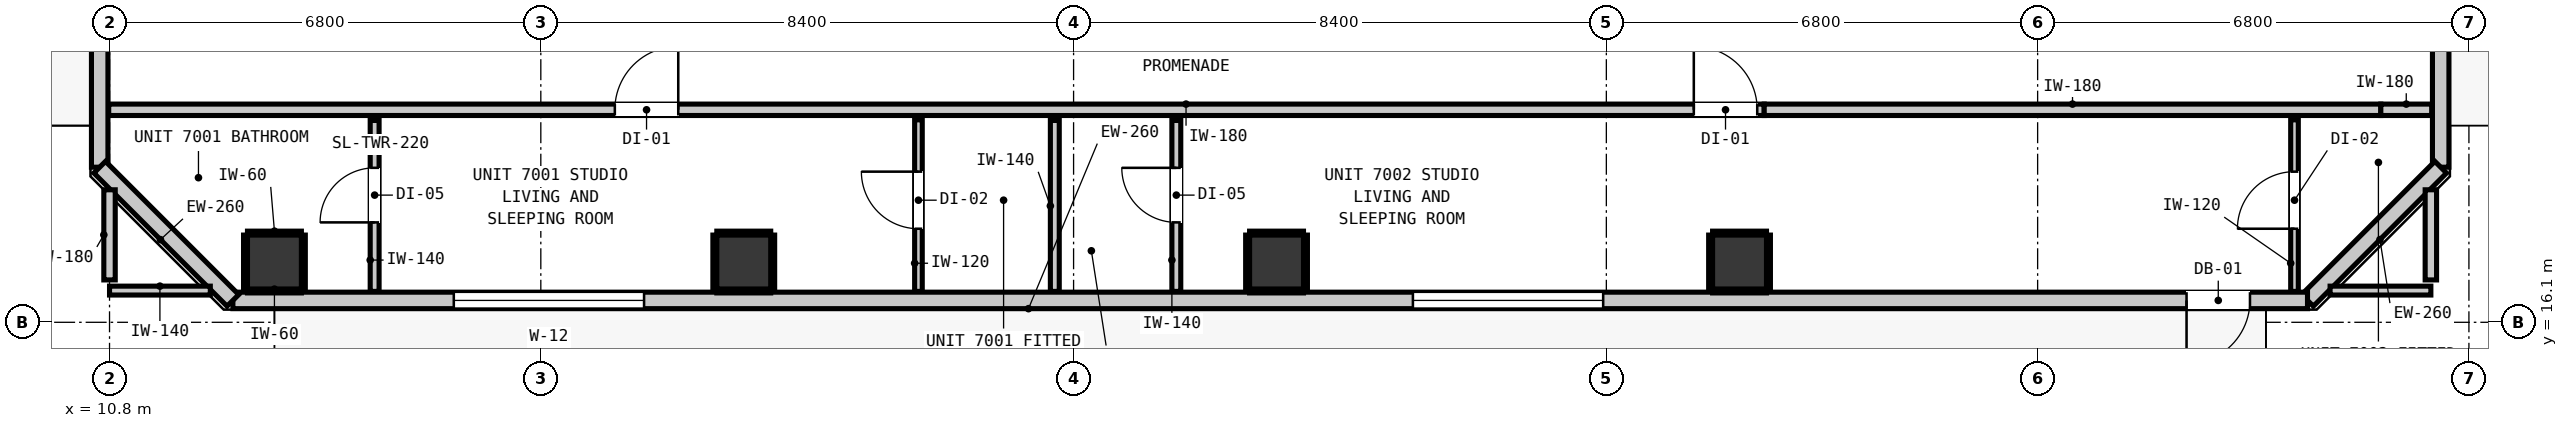
"""IFC4 building model, lengths in metres.
Left out: names, types, materials, properties, quantities, classifications, styles, units other than length and angle.
Written with IfcOpenShell. Run it as: python <this file> out.ifc"""

import sys

from ifc_helpers import new_model, si_unit, direction, frame, frame_2d, origin, origin_2d, place, context, subcontext, project, spatial, rectangle, extrude, element, fill, save


model = new_model("IFC4")
c1 = context("Model", 3, precision=1e-05, world=origin(), true_north=direction((0.0, 1.0)))
c2 = subcontext(c1, "Body", "Model", "MODEL_VIEW")
j1 = project(units=[si_unit("LENGTHUNIT", "METRE"), si_unit("PLANEANGLEUNIT", "RADIAN")], contexts=[c1])
p1 = place(None, origin())
s1 = spatial("IfcSite", under=j1, at=p1, CompositionType="ELEMENT")
p2 = place(p1, origin())
s2 = spatial("IfcBuilding", under=s1, at=p2, CompositionType="ELEMENT")
p3 = place(p2, frame((0.0, 0.0, 241.24)))
s3 = spatial("IfcBuildingStorey", under=s2, at=p3, CompositionType="ELEMENT", Elevation=241.24)
for number, where, z_axis, x_axis in (
    (1, (13.4, 17.05, 0.0), (0.0, 0.0, 1.0), (1.0, 0.0, 0.0)),
    (2, (20.8, 17.05, 0.0), (0.0, 0.0, 1.0), (1.0, 0.0, 0.0)),
    (3, (29.2, 17.05, 0.0), (0.0, 0.0, 1.0), (1.0, 0.0, 0.0)),
    (4, (36.5, 17.05, 0.0), (0.0, 0.0, 1.0), (1.0, 0.0, 0.0)),
):
    element("IfcColumn", number, at=place(p3, frame(where, z_axis=z_axis, x_axis=x_axis)), inside=s3, PredefinedType="COLUMN", context=c2, shape_type="SweptSolid", body=[
        extrude(rectangle(XDim=0.85, YDim=0.85, at=origin_2d()), origin(), (0.0, 0.0, 1.0), 3.32),
    ])
p4 = place(p3, frame((10.645, 18.545, 0.0), z_axis=(0.0, 0.0, 1.0), x_axis=(0.0, 1.0, 0.0)))
e5 = element("IfcWall", 5, at=p4, inside=s3, PredefinedType="STANDARD", context=c2, shape_type="SweptSolid", body=[
    extrude(rectangle(XDim=30.31, YDim=0.26, at=frame_2d((15.155, 0.0))), origin(), (0.0, 0.0, 1.0), 3.1),
])
p5 = place(p4, frame((27.695, 0.0, 0.0)))
e6 = element("IfcOpeningElement", 6, at=p5, cuts=e5, PredefinedType="OPENING", context=c2, shape_type="SweptSolid", body=[
    extrude(rectangle(XDim=1.0, YDim=2.15, at=frame_2d((0.5, 1.075))), frame((0.0, 0.14, 0.0), z_axis=(0.0, -1.0, 0.0), x_axis=(1.0, 0.0, 0.0)), (0.0, 0.0, 1.0), 0.28),
])
p6 = place(p4, frame((29.108, 0.0, 0.85)))
e7 = element("IfcOpeningElement", 7, at=p6, cuts=e5, PredefinedType="OPENING", context=c2, shape_type="SweptSolid", body=[
    extrude(rectangle(XDim=0.9, YDim=1.5, at=frame_2d((0.45, 0.75))), frame((0.0, 0.14, 0.0), z_axis=(0.0, -1.0, 0.0), x_axis=(1.0, 0.0, 0.0)), (0.0, 0.0, 1.0), 0.28),
])
p7 = place(p3, frame((47.555, 48.855, 0.0), z_axis=(0.0, 0.0, 1.0), x_axis=(0.0, -1.0, 0.0)))
e8 = element("IfcWall", 8, at=p7, inside=s3, PredefinedType="STANDARD", context=c2, shape_type="SweptSolid", body=[
    extrude(rectangle(XDim=30.31, YDim=0.26, at=frame_2d((15.155, 0.0))), origin(), (0.0, 0.0, 1.0), 3.1),
])
p8 = place(p7, frame((0.91, 0.0, 0.0)))
e9 = element("IfcOpeningElement", 9, at=p8, cuts=e8, PredefinedType="OPENING", context=c2, shape_type="SweptSolid", body=[
    extrude(rectangle(XDim=1.0, YDim=2.15, at=frame_2d((0.5, 1.075))), frame((0.0, 0.14, 0.0), z_axis=(0.0, -1.0, 0.0), x_axis=(1.0, 0.0, 0.0)), (0.0, 0.0, 1.0), 0.28),
])
p9 = place(p7, frame((2.957, 0.0, 0.85)))
e10 = element("IfcOpeningElement", 10, at=p9, cuts=e8, PredefinedType="OPENING", context=c2, shape_type="SweptSolid", body=[
    extrude(rectangle(XDim=3.0, YDim=2.1, at=frame_2d((1.5, 1.05))), frame((0.0, 0.14, 0.0), z_axis=(0.0, -1.0, 0.0), x_axis=(1.0, 0.0, 0.0)), (0.0, 0.0, 1.0), 0.28),
])
p10 = place(p7, frame((21.005, 0.0, 0.85)))
e11 = element("IfcOpeningElement", 11, at=p10, cuts=e8, PredefinedType="OPENING", context=c2, shape_type="SweptSolid", body=[
    extrude(rectangle(XDim=3.0, YDim=2.1, at=frame_2d((1.5, 1.05))), frame((0.0, 0.14, 0.0), z_axis=(0.0, -1.0, 0.0), x_axis=(1.0, 0.0, 0.0)), (0.0, 0.0, 1.0), 0.28),
])
p11 = place(p3, frame((47.555, 18.545, 0.0), z_axis=(0.0, 0.0, 1.0), x_axis=(-0.707106781187, -0.707106781187, 0.0)))
e12 = element("IfcWall", 12, at=p11, inside=s3, PredefinedType="STANDARD", context=c2, shape_type="SweptSolid", body=[
    extrude(rectangle(XDim=2.97, YDim=0.26, at=frame_2d((1.485, 0.0))), origin(), (0.0, 0.0, 1.0), 3.1),
])
p12 = place(p3, frame((45.455, 16.445, 0.0), z_axis=(0.0, 0.0, 1.0), x_axis=(-1.0, 0.0, 0.0)))
e13 = element("IfcWall", 13, at=p12, inside=s3, PredefinedType="STANDARD", context=c2, shape_type="SweptSolid", body=[
    extrude(rectangle(XDim=32.71, YDim=0.26, at=frame_2d((16.355, 0.0))), origin(), (0.0, 0.0, 1.0), 3.1),
])
p13 = place(p12, frame((0.907, 0.0, 0.0)))
e14 = element("IfcOpeningElement", 14, at=p13, cuts=e13, PredefinedType="OPENING", context=c2, shape_type="SweptSolid", body=[
    extrude(rectangle(XDim=1.0, YDim=2.15, at=frame_2d((0.5, 1.075))), frame((0.0, 0.14, 0.0), z_axis=(0.0, -1.0, 0.0), x_axis=(1.0, 0.0, 0.0)), (0.0, 0.0, 1.0), 0.28),
])
p14 = place(p12, frame((26.227, 0.0, 0.85)))
e15 = element("IfcOpeningElement", 15, at=p14, cuts=e13, PredefinedType="OPENING", context=c2, shape_type="SweptSolid", body=[
    extrude(rectangle(XDim=3.0, YDim=2.1, at=frame_2d((1.5, 1.05))), frame((0.0, 0.14, 0.0), z_axis=(0.0, -1.0, 0.0), x_axis=(1.0, 0.0, 0.0)), (0.0, 0.0, 1.0), 0.28),
])
p15 = place(p12, frame((11.105, 0.0, 0.85)))
e16 = element("IfcOpeningElement", 16, at=p15, cuts=e13, PredefinedType="OPENING", context=c2, shape_type="SweptSolid", body=[
    extrude(rectangle(XDim=3.0, YDim=2.1, at=frame_2d((1.5, 1.05))), frame((0.0, 0.14, 0.0), z_axis=(0.0, -1.0, 0.0), x_axis=(1.0, 0.0, 0.0)), (0.0, 0.0, 1.0), 0.28),
])
p16 = place(p3, frame((12.745, 16.445, 0.0), z_axis=(0.0, 0.0, 1.0), x_axis=(-0.707147883682, 0.707065676302, 0.0)))
e17 = element("IfcWall", 17, at=p16, inside=s3, PredefinedType="STANDARD", context=c2, shape_type="SweptSolid", body=[
    extrude(rectangle(XDim=2.97, YDim=0.26, at=frame_2d((1.485, 0.0))), origin(), (0.0, 0.0, 1.0), 3.1),
])
p17 = place(p3, frame((10.787, 19.45, 0.0), z_axis=(0.0, 0.0, 1.0), x_axis=(1.0, 0.0, 0.0)))
e18 = element("IfcWall", 18, at=p17, inside=s3, PredefinedType="PARTITIONING", context=c2, shape_type="SweptSolid", body=[
    extrude(rectangle(XDim=26.102, YDim=0.18, at=frame_2d((13.051, 0.0))), origin(), (0.0, 0.0, 1.0), 3.1),
])
p18 = place(p17, frame((7.98, 0.0, 0.0)))
e19 = element("IfcOpeningElement", 19, at=p18, cuts=e18, PredefinedType="OPENING", context=c2, shape_type="SweptSolid", body=[
    extrude(rectangle(XDim=1.0, YDim=2.15, at=frame_2d((0.5, 1.075))), frame((0.0, 0.1, 0.0), z_axis=(0.0, -1.0, 0.0), x_axis=(1.0, 0.0, 0.0)), (0.0, 0.0, 1.0), 0.2),
])
p19 = place(p17, frame((24.992, 0.0, 0.0)))
e20 = element("IfcOpeningElement", 20, at=p19, cuts=e18, PredefinedType="OPENING", context=c2, shape_type="SweptSolid", body=[
    extrude(rectangle(XDim=1.0, YDim=2.15, at=frame_2d((0.5, 1.075))), frame((0.0, 0.1, 0.0), z_axis=(0.0, -1.0, 0.0), x_axis=(1.0, 0.0, 0.0)), (0.0, 0.0, 1.0), 0.2),
])
p20 = place(p3, frame((36.889, 19.45, 0.0), z_axis=(0.0, 0.0, 1.0), x_axis=(1.0, 0.0, 0.0)))
e21 = element("IfcWall", 21, at=p20, inside=s3, PredefinedType="PARTITIONING", context=c2, shape_type="SweptSolid", body=[
    extrude(rectangle(XDim=9.722, YDim=0.18, at=frame_2d((4.861, 0.0))), origin(), (0.0, 0.0, 1.0), 2.477),
])
p21 = place(p3, frame((46.611, 19.45, 0.0), z_axis=(0.0, 0.0, 1.0), x_axis=(1.0, 0.0, 0.0)))
e22 = element("IfcWall", 22, at=p21, inside=s3, PredefinedType="PARTITIONING", context=c2, shape_type="SweptSolid", body=[
    extrude(rectangle(XDim=0.802, YDim=0.18, at=frame_2d((0.401, 0.0))), origin(), (0.0, 0.0, 1.0), 3.1),
])
for number, where, z_axis, x_axis in (
    (23, (10.8, 16.6, 0.0), (0.0, 0.0, 1.0), (1.0, 0.0, 0.0)),
    (24, (45.811, 16.6, 0.0), (0.0, 0.0, 1.0), (1.0, 0.0, 0.0)),
):
    element("IfcWall", number, at=place(p3, frame(where, z_axis=z_axis, x_axis=x_axis)), inside=s3, PredefinedType="PARTITIONING", context=c2, shape_type="SweptSolid", body=[
        extrude(rectangle(XDim=1.589, YDim=0.14, at=frame_2d((0.794, 0.0))), origin(), (0.0, 0.0, 1.0), 3.1),
    ])
for number, where, z_axis, x_axis in (
    (25, (10.8, 16.768, 0.0), (0.0, 0.0, 1.0), (0.0, 1.0, 0.0)),
    (26, (47.4, 16.768, 0.0), (0.0, 0.0, 1.0), (0.0, 1.0, 0.0)),
):
    element("IfcWall", number, at=place(p3, frame(where, z_axis=z_axis, x_axis=x_axis)), inside=s3, PredefinedType="PARTITIONING", context=c2, shape_type="SweptSolid", body=[
        extrude(rectangle(XDim=1.421, YDim=0.18, at=frame_2d((0.71, 0.0))), origin(), (0.0, 0.0, 1.0), 3.1),
    ])
p22 = place(p3, frame((14.98, 16.587, 0.0), z_axis=(0.0, 0.0, 1.0), x_axis=(0.0, 1.0, 0.0)))
e27 = element("IfcWall", 27, at=p22, inside=s3, PredefinedType="PARTITIONING", context=c2, shape_type="SweptSolid", body=[
    extrude(rectangle(XDim=2.695, YDim=0.14, at=frame_2d((1.348, 0.0))), origin(), (0.0, 0.0, 1.0), 3.1),
])
p23 = place(p22, frame((1.088, 0.0, 0.0)))
e28 = element("IfcOpeningElement", 28, at=p23, cuts=e27, PredefinedType="OPENING", context=c2, shape_type="SweptSolid", body=[
    extrude(rectangle(XDim=0.86, YDim=2.02, at=frame_2d((0.43, 1.01))), frame((0.0, 0.08, 0.0), z_axis=(0.0, -1.0, 0.0), x_axis=(1.0, 0.0, 0.0)), (0.0, 0.0, 1.0), 0.16),
])
p24 = place(p3, frame((25.704, 16.587, 0.0), z_axis=(0.0, 0.0, 1.0), x_axis=(0.0, 1.0, 0.0)))
e29 = element("IfcWall", 29, at=p24, inside=s3, PredefinedType="PARTITIONING", context=c2, shape_type="SweptSolid", body=[
    extrude(rectangle(XDim=2.695, YDim=0.14, at=frame_2d((1.348, 0.0))), origin(), (0.0, 0.0, 1.0), 3.1),
])
p25 = place(p3, frame((27.62, 16.587, 0.0), z_axis=(0.0, 0.0, 1.0), x_axis=(0.0, 1.0, 0.0)))
e30 = element("IfcWall", 30, at=p25, inside=s3, PredefinedType="PARTITIONING", context=c2, shape_type="SweptSolid", body=[
    extrude(rectangle(XDim=2.695, YDim=0.14, at=frame_2d((1.348, 0.0))), origin(), (0.0, 0.0, 1.0), 3.1),
])
p26 = place(p25, frame((1.088, 0.0, 0.0)))
e31 = element("IfcOpeningElement", 31, at=p26, cuts=e30, PredefinedType="OPENING", context=c2, shape_type="SweptSolid", body=[
    extrude(rectangle(XDim=0.86, YDim=2.02, at=frame_2d((0.43, 1.01))), frame((0.0, 0.08, 0.0), z_axis=(0.0, -1.0, 0.0), x_axis=(1.0, 0.0, 0.0)), (0.0, 0.0, 1.0), 0.16),
])
p27 = place(p3, frame((23.554, 16.587, 0.0), z_axis=(0.0, 0.0, 1.0), x_axis=(0.0, 1.0, 0.0)))
e32 = element("IfcWall", 32, at=p27, inside=s3, PredefinedType="PARTITIONING", context=c2, shape_type="SweptSolid", body=[
    extrude(rectangle(XDim=2.705, YDim=0.12, at=frame_2d((1.353, 0.0))), origin(), (0.0, 0.0, 1.0), 3.1),
])
p28 = place(p27, frame((0.988, 0.0, 0.0)))
e33 = element("IfcOpeningElement", 33, at=p28, cuts=e32, PredefinedType="OPENING", context=c2, shape_type="SweptSolid", body=[
    extrude(rectangle(XDim=0.9, YDim=2.1, at=frame_2d((0.45, 1.05))), frame((0.0, 0.07, 0.0), z_axis=(0.0, -1.0, 0.0), x_axis=(1.0, 0.0, 0.0)), (0.0, 0.0, 1.0), 0.14),
])
p29 = place(p3, frame((45.25, 16.587, 0.0), z_axis=(0.0, 0.0, 1.0), x_axis=(0.0, 1.0, 0.0)))
e34 = element("IfcWall", 34, at=p29, inside=s3, PredefinedType="PARTITIONING", context=c2, shape_type="SweptSolid", body=[
    extrude(rectangle(XDim=2.705, YDim=0.12, at=frame_2d((1.353, 0.0))), origin(), (0.0, 0.0, 1.0), 3.1),
])
p30 = place(p29, frame((0.988, 0.0, 0.0)))
e35 = element("IfcOpeningElement", 35, at=p30, cuts=e34, PredefinedType="OPENING", context=c2, shape_type="SweptSolid", body=[
    extrude(rectangle(XDim=0.9, YDim=2.1, at=frame_2d((0.45, 1.05))), frame((0.0, 0.07, 0.0), z_axis=(0.0, -1.0, 0.0), x_axis=(1.0, 0.0, 0.0)), (0.0, 0.0, 1.0), 0.14),
])
for number, where, z_axis, x_axis in (
    (36, (12.975, 16.593, 0.0), (0.0, 0.0, 1.0), (1.0, 0.0, 0.0)),
    (37, (12.975, 17.507, 0.0), (0.0, 0.0, 1.0), (1.0, 0.0, 0.0)),
):
    element("IfcWall", number, at=place(p3, frame(where, z_axis=z_axis, x_axis=x_axis)), inside=s3, PredefinedType="PARTITIONING", context=c2, shape_type="SweptSolid", body=[
        extrude(rectangle(XDim=0.85, YDim=0.06, at=frame_2d((0.425, 0.0))), origin(), (0.0, 0.0, 1.0), 1.45),
    ])
for number, where, z_axis, x_axis in (
    (38, (12.943, 16.625, 0.0), (0.0, 0.0, 1.0), (0.0, 1.0, 0.0)),
    (39, (13.857, 16.625, 0.0), (0.0, 0.0, 1.0), (0.0, 1.0, 0.0)),
    (40, (20.375, 16.593, 0.0), (0.0, 0.0, 1.0), (1.0, 0.0, 0.0)),
    (41, (20.375, 17.507, 0.0), (0.0, 0.0, 1.0), (1.0, 0.0, 0.0)),
    (42, (20.343, 16.625, 0.0), (0.0, 0.0, 1.0), (0.0, 1.0, 0.0)),
    (43, (21.257, 16.625, 0.0), (0.0, 0.0, 1.0), (0.0, 1.0, 0.0)),
    (44, (28.775, 16.593, 0.0), (0.0, 0.0, 1.0), (1.0, 0.0, 0.0)),
    (45, (28.775, 17.507, 0.0), (0.0, 0.0, 1.0), (1.0, 0.0, 0.0)),
    (46, (28.743, 16.625, 0.0), (0.0, 0.0, 1.0), (0.0, 1.0, 0.0)),
    (47, (29.657, 16.625, 0.0), (0.0, 0.0, 1.0), (0.0, 1.0, 0.0)),
    (48, (36.075, 16.593, 0.0), (0.0, 0.0, 1.0), (1.0, 0.0, 0.0)),
    (49, (36.075, 17.507, 0.0), (0.0, 0.0, 1.0), (1.0, 0.0, 0.0)),
    (50, (36.043, 16.625, 0.0), (0.0, 0.0, 1.0), (0.0, 1.0, 0.0)),
    (51, (36.957, 16.625, 0.0), (0.0, 0.0, 1.0), (0.0, 1.0, 0.0)),
):
    element("IfcWall", number, at=place(p3, frame(where, z_axis=z_axis, x_axis=x_axis)), inside=s3, PredefinedType="PARTITIONING", context=c2, shape_type="SweptSolid", body=[
        extrude(rectangle(XDim=0.85, YDim=0.06, at=frame_2d((0.425, 0.0))), origin(), (0.0, 0.0, 1.0), 1.45),
    ])
p31 = place(p13, origin())
e52 = element("IfcDoor", 52, at=p31, inside=s3, OperationType="SINGLE_SWING_RIGHT", PredefinedType="DOOR", context=c2, shape_type="SweptSolid", body=[
    extrude(rectangle(XDim=1.0, YDim=2.15, at=frame_2d((0.5, 1.075))), frame((0.0, 0.025, 0.0), z_axis=(0.0, -1.0, 0.0), x_axis=(1.0, 0.0, 0.0)), (0.0, 0.0, 1.0), 0.05),
])
fill(e14, e52)
p32 = place(p14, origin())
e53 = element("IfcWindow", 53, at=p32, inside=s3, PartitioningType="SINGLE_PANEL", PredefinedType="WINDOW", context=c2, shape_type="SweptSolid", body=[
    extrude(rectangle(XDim=3.0, YDim=2.1, at=frame_2d((1.5, 1.05))), frame((0.0, 0.03, 0.0), z_axis=(0.0, -1.0, 0.0), x_axis=(1.0, 0.0, 0.0)), (0.0, 0.0, 1.0), 0.06),
])
fill(e15, e53)
p33 = place(p15, origin())
e54 = element("IfcWindow", 54, at=p33, inside=s3, PartitioningType="SINGLE_PANEL", PredefinedType="WINDOW", context=c2, shape_type="SweptSolid", body=[
    extrude(rectangle(XDim=3.0, YDim=2.1, at=frame_2d((1.5, 1.05))), frame((0.0, 0.03, 0.0), z_axis=(0.0, -1.0, 0.0), x_axis=(1.0, 0.0, 0.0)), (0.0, 0.0, 1.0), 0.06),
])
fill(e16, e54)
p34 = place(p18, origin())
e55 = element("IfcDoor", 55, at=p34, inside=s3, OperationType="SINGLE_SWING_RIGHT", PredefinedType="DOOR", context=c2, shape_type="SweptSolid", body=[
    extrude(rectangle(XDim=1.0, YDim=2.15, at=frame_2d((0.5, 1.075))), frame((0.0, 0.025, 0.0), z_axis=(0.0, -1.0, 0.0), x_axis=(1.0, 0.0, 0.0)), (0.0, 0.0, 1.0), 0.05),
])
fill(e19, e55)
p35 = place(p23, origin())
e56 = element("IfcDoor", 56, at=p35, inside=s3, OperationType="SINGLE_SWING_LEFT", PredefinedType="DOOR", context=c2, shape_type="SweptSolid", body=[
    extrude(rectangle(XDim=0.86, YDim=2.02, at=frame_2d((0.43, 1.01))), frame((0.0, 0.025, 0.0), z_axis=(0.0, -1.0, 0.0), x_axis=(1.0, 0.0, 0.0)), (0.0, 0.0, 1.0), 0.05),
])
fill(e28, e56)
p36 = place(p28, origin())
e57 = element("IfcDoor", 57, at=p36, inside=s3, OperationType="SINGLE_SWING_RIGHT", PredefinedType="DOOR", context=c2, shape_type="SweptSolid", body=[
    extrude(rectangle(XDim=0.9, YDim=2.1, at=frame_2d((0.45, 1.05))), frame((0.0, 0.025, 0.0), z_axis=(0.0, -1.0, 0.0), x_axis=(1.0, 0.0, 0.0)), (0.0, 0.0, 1.0), 0.05),
])
fill(e33, e57)
p37 = place(p19, origin())
e58 = element("IfcDoor", 58, at=p37, inside=s3, OperationType="SINGLE_SWING_LEFT", PredefinedType="DOOR", context=c2, shape_type="SweptSolid", body=[
    extrude(rectangle(XDim=1.0, YDim=2.15, at=frame_2d((0.5, 1.075))), frame((0.0, 0.025, 0.0), z_axis=(0.0, -1.0, 0.0), x_axis=(1.0, 0.0, 0.0)), (0.0, 0.0, 1.0), 0.05),
])
fill(e20, e58)
p38 = place(p26, origin())
e59 = element("IfcDoor", 59, at=p38, inside=s3, OperationType="SINGLE_SWING_RIGHT", PredefinedType="DOOR", context=c2, shape_type="SweptSolid", body=[
    extrude(rectangle(XDim=0.86, YDim=2.02, at=frame_2d((0.43, 1.01))), frame((0.0, 0.025, 0.0), z_axis=(0.0, -1.0, 0.0), x_axis=(1.0, 0.0, 0.0)), (0.0, 0.0, 1.0), 0.05),
])
fill(e31, e59)
p39 = place(p30, origin())
e60 = element("IfcDoor", 60, at=p39, inside=s3, OperationType="SINGLE_SWING_LEFT", PredefinedType="DOOR", context=c2, shape_type="SweptSolid", body=[
    extrude(rectangle(XDim=0.9, YDim=2.1, at=frame_2d((0.45, 1.05))), frame((0.0, 0.025, 0.0), z_axis=(0.0, -1.0, 0.0), x_axis=(1.0, 0.0, 0.0)), (0.0, 0.0, 1.0), 0.05),
])
fill(e35, e60)
save(model, sys.argv[1])
